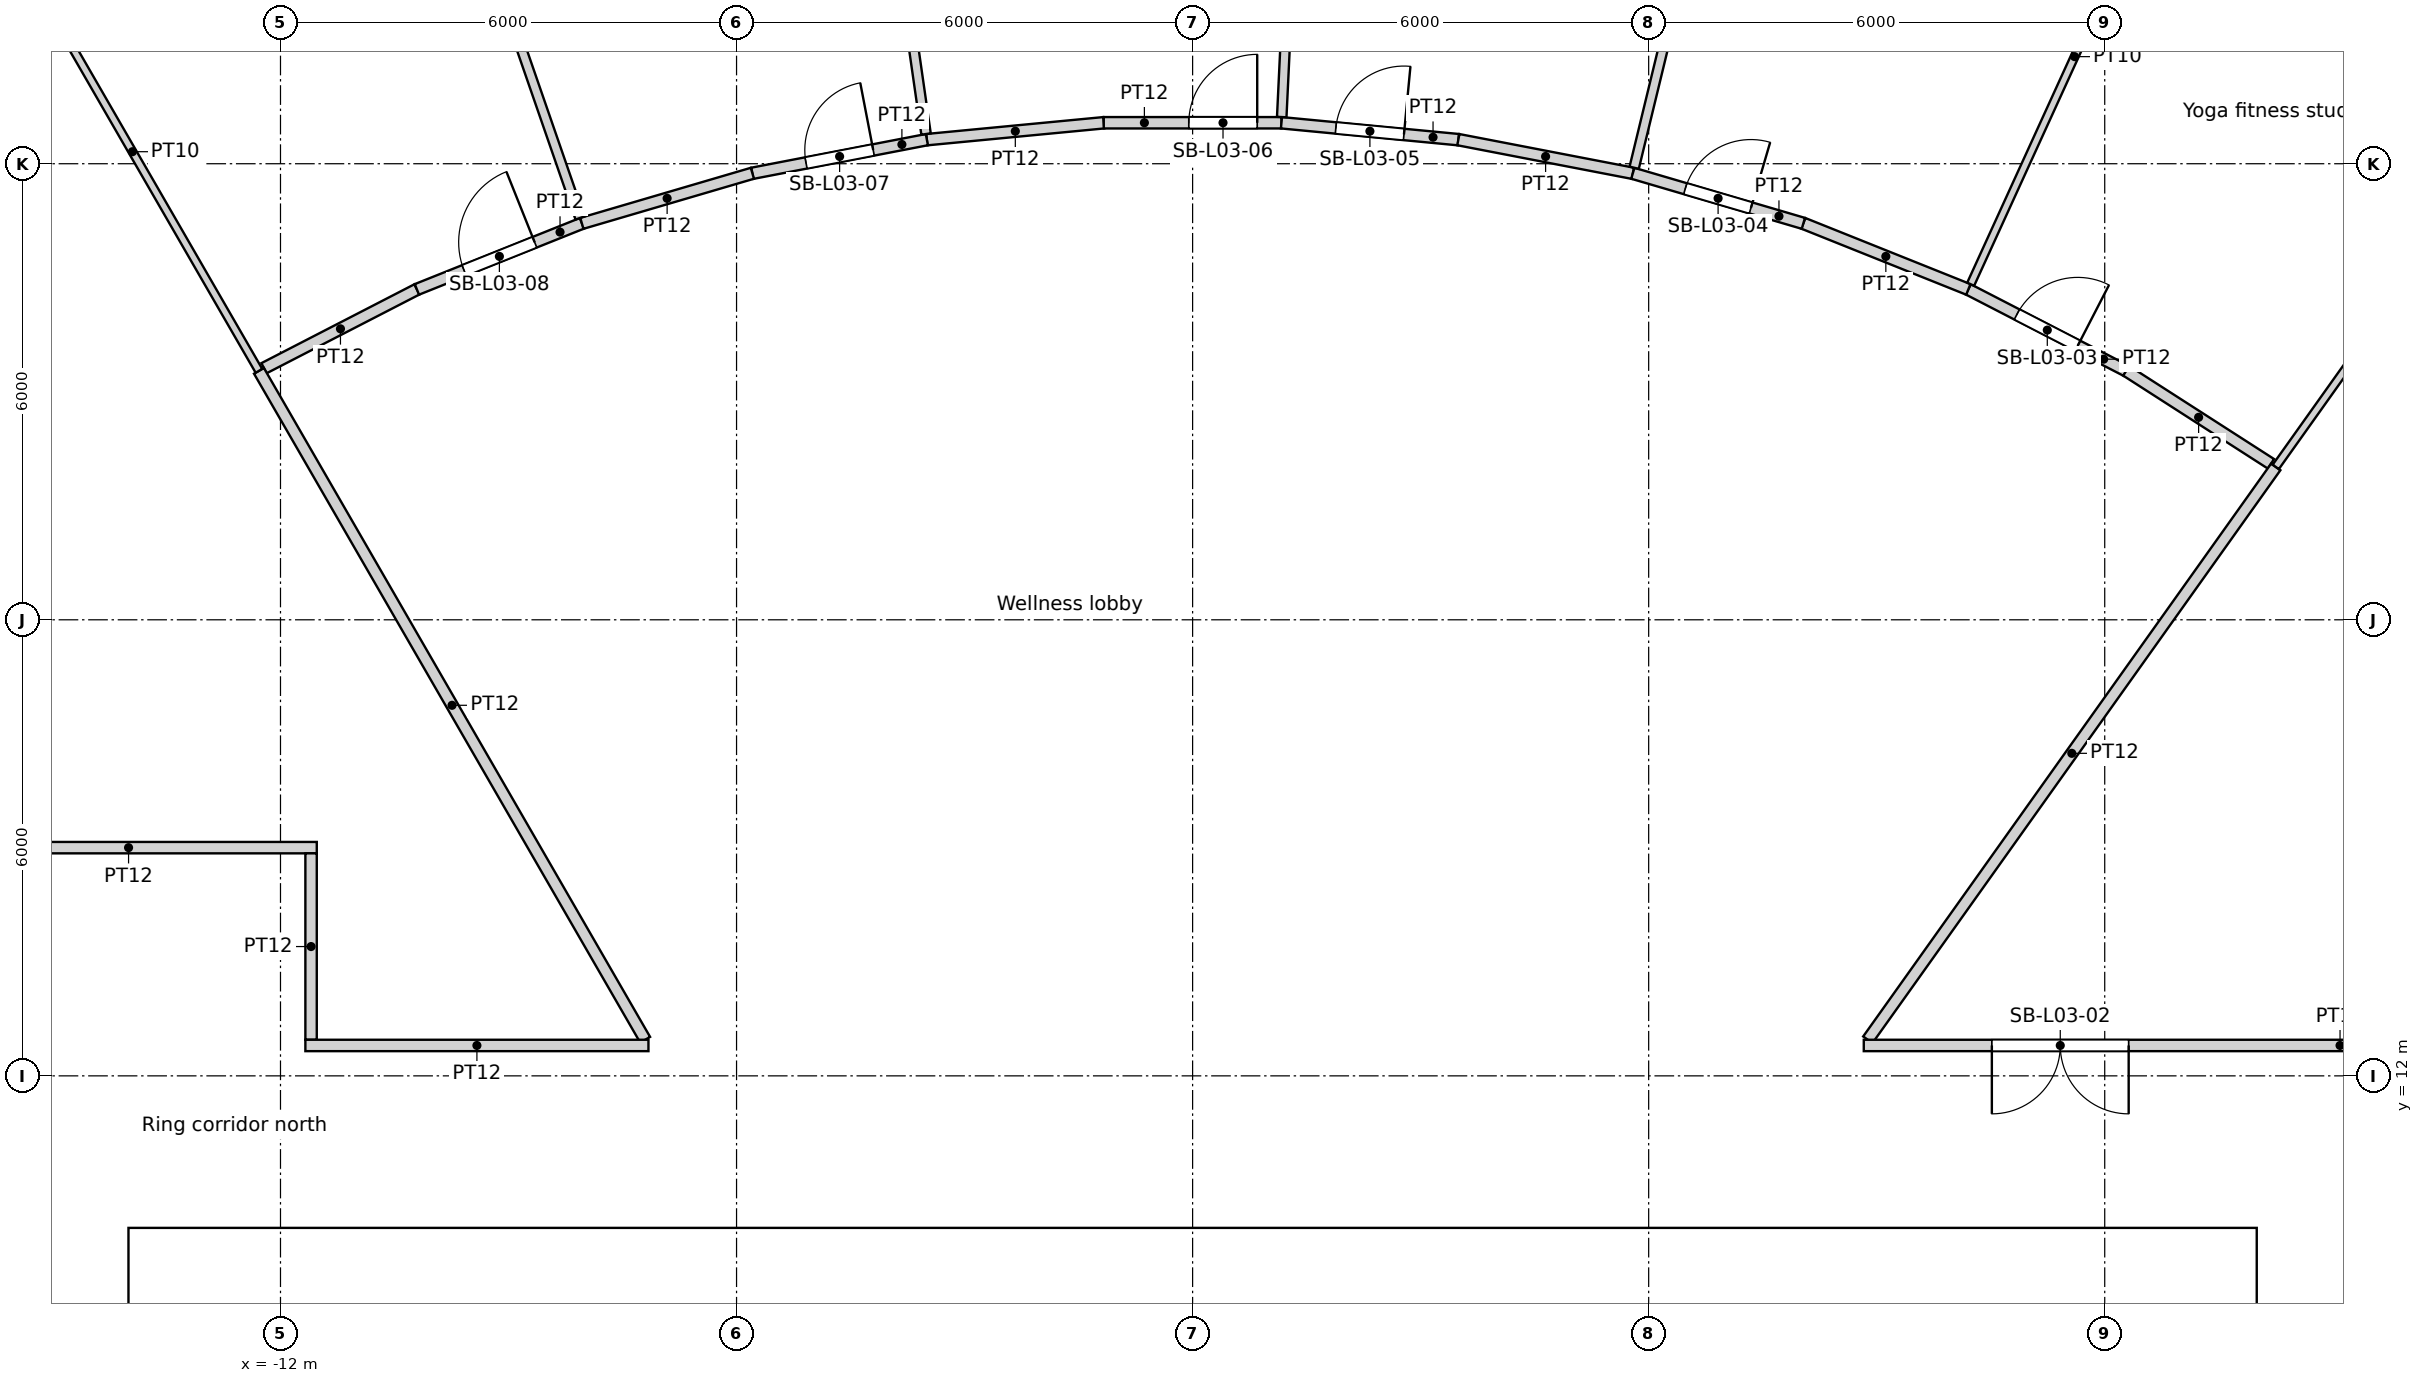
"""IFC4 building model, lengths in metres.
Left out: names, types, materials, properties, quantities, classifications, styles, units other than length and angle.
Written with IfcOpenShell. Run it as: python <this file> out.ifc"""

import sys

from ifc_helpers import new_model, si_unit, direction, frame, frame_2d, origin, origin_2d, place, context, subcontext, project, spatial, rectangle, circle, extrude, element, fill, save


model = new_model("IFC4")
c1 = context("Model", 3, precision=1e-05, world=origin(), true_north=direction((0.0, 1.0)))
c2 = subcontext(c1, "Body", "Model", "MODEL_VIEW")
j1 = project(units=[si_unit("LENGTHUNIT", "METRE"), si_unit("PLANEANGLEUNIT", "RADIAN")], contexts=[c1])
p1 = place(None, origin())
s1 = spatial("IfcSite", under=j1, at=p1, CompositionType="ELEMENT")
p2 = place(p1, origin())
s2 = spatial("IfcBuilding", under=s1, at=p2, CompositionType="ELEMENT")
p3 = place(p2, frame((0.0, 0.0, 18.6)))
s3 = spatial("IfcBuildingStorey", under=s2, at=p3, CompositionType="ELEMENT", Elevation=18.6)
for number, where, z_axis, x_axis in (
    (1, (14.659, 19.69, 0.0), (0.0, 0.0, 1.0), (1.0, 0.0, 0.0)),
    (2, (9.723, 22.54, 0.0), (0.0, 0.0, 1.0), (1.0, 0.0, 0.0)),
    (3, (4.263, 24.175, 0.0), (0.0, 0.0, 1.0), (1.0, 0.0, 0.0)),
    (4, (-1.427, 24.506, 0.0), (0.0, 0.0, 1.0), (1.0, 0.0, 0.0)),
    (5, (-7.04, 23.516, 0.0), (0.0, 0.0, 1.0), (1.0, 0.0, 0.0)),
    (6, (-12.274, 21.259, 0.0), (0.0, 0.0, 1.0), (1.0, 0.0, 0.0)),
):
    element("IfcColumn", number, at=place(p3, frame(where, z_axis=z_axis, x_axis=x_axis)), inside=s3, PredefinedType="COLUMN", context=c2, shape_type="SweptSolid", body=[
        extrude(circle(Radius=0.75, at=origin_2d()), origin(), (0.0, 0.0, 1.0), 4.8),
    ])
for number, where, z_axis, x_axis in (
    (7, (15.552, 10.603, 0.0), (0.0, 0.0, 1.0), (1.0, 0.0, 0.0)),
    (8, (11.735, 14.716, 0.0), (0.0, 0.0, 1.0), (1.0, 0.0, 0.0)),
    (9, (6.876, 17.521, 0.0), (0.0, 0.0, 1.0), (1.0, 0.0, 0.0)),
    (10, (1.406, 18.77, 0.0), (0.0, 0.0, 1.0), (1.0, 0.0, 0.0)),
    (11, (-4.188, 18.35, 0.0), (0.0, 0.0, 1.0), (1.0, 0.0, 0.0)),
    (12, (-9.411, 16.301, 0.0), (0.0, 0.0, 1.0), (1.0, 0.0, 0.0)),
    (13, (-13.798, 12.802, 0.0), (0.0, 0.0, 1.0), (1.0, 0.0, 0.0)),
):
    element("IfcColumn", number, at=place(p3, frame(where, z_axis=z_axis, x_axis=x_axis)), inside=s3, PredefinedType="COLUMN", context=c2, shape_type="SweptSolid", body=[
        extrude(circle(Radius=0.8, at=origin_2d()), origin(), (0.0, 0.0, 1.0), 4.8),
    ])
p4 = place(p3, frame((-14.0, 9.4, 0.0), z_axis=(0.0, 0.0, 1.0), x_axis=(1.0, 0.0, 0.0)))
e14 = element("IfcWall", 14, at=p4, inside=s3, PredefinedType="SOLIDWALL", context=c2, shape_type="SweptSolid", body=[
    extrude(rectangle(XDim=28.0, YDim=1.2, at=frame_2d((14.0, 0.0))), origin(), (0.0, 0.0, 1.0), 4.8),
])
p5 = place(p4, frame((9.8, 0.0, 0.0)))
e15 = element("IfcOpeningElement", 15, at=p5, cuts=e14, PredefinedType="OPENING", context=c2, shape_type="SweptSolid", body=[
    extrude(rectangle(XDim=1.8, YDim=2.1, at=frame_2d((0.9, 1.05))), frame((0.0, 0.6, 0.0), z_axis=(0.0, -1.0, 0.0), x_axis=(1.0, 0.0, 0.0)), (0.0, 0.0, 1.0), 1.2),
])
p6 = place(p3, frame((-15.612, 27.041, 0.0), z_axis=(0.0, 0.0, 1.0), x_axis=(0.499980638446, -0.866036581894, 0.0)))
e16 = element("IfcWall", 16, at=p6, inside=s3, PredefinedType="PARTITIONING", context=c2, shape_type="SweptSolid", body=[
    extrude(rectangle(XDim=6.657, YDim=0.1, at=frame_2d((3.329, 0.0))), origin(), (0.0, 0.0, 1.0), 3.75),
])
p7 = place(p3, frame((-12.283, 21.275, 0.0), z_axis=(0.0, 0.0, 1.0), x_axis=(0.500014995272, -0.866016746087, 0.0)))
e17 = element("IfcWall", 17, at=p7, inside=s3, PredefinedType="PARTITIONING", context=c2, shape_type="SweptSolid", body=[
    extrude(rectangle(XDim=10.162, YDim=0.15, at=frame_2d((5.081, 0.0))), origin(), (0.0, 0.0, 1.0), 3.75),
])
p8 = place(p3, frame((-11.598, 12.475, 0.0), z_axis=(0.0, 0.0, 1.0), x_axis=(0.0, 1.0, 0.0)))
e18 = element("IfcWall", 18, at=p8, inside=s3, PredefinedType="PARTITIONING", context=c2, shape_type="SweptSolid", body=[
    extrude(rectangle(XDim=2.452, YDim=0.15, at=frame_2d((1.226, 0.0))), origin(), (0.0, 0.0, 1.0), 3.75),
])
p9 = place(p3, frame((-11.523, 15.002, 0.0), z_axis=(0.0, 0.0, 1.0), x_axis=(-1.0, 0.0, 0.0)))
e19 = element("IfcWall", 19, at=p9, inside=s3, PredefinedType="PARTITIONING", context=c2, shape_type="SweptSolid", body=[
    extrude(rectangle(XDim=4.952, YDim=0.15, at=frame_2d((2.476, 0.0))), origin(), (0.0, 0.0, 1.0), 3.75),
])
p10 = place(p3, frame((-10.212, 29.507, 0.0), z_axis=(0.0, 0.0, 1.0), x_axis=(0.327055786406, -0.945005033097, 0.0)))
e20 = element("IfcWall", 20, at=p10, inside=s3, PredefinedType="PARTITIONING", context=c2, shape_type="SweptSolid", body=[
    extrude(rectangle(XDim=6.583, YDim=0.125, at=frame_2d((3.291, 0.0))), origin(), (0.0, 0.0, 1.0), 3.75),
])
p11 = place(p3, frame((-10.205, 22.347, 0.0), z_axis=(0.0, 0.0, 1.0), x_axis=(-0.888857404952, -0.458183929947, 0.0)))
e21 = element("IfcWall", 21, at=p11, inside=s3, PredefinedType="PARTITIONING", context=c2, shape_type="SweptSolid", body=[
    extrude(rectangle(XDim=2.263, YDim=0.15, at=frame_2d((1.131, 0.0))), origin(), (0.0, 0.0, 1.0), 3.75),
])
p12 = place(p3, frame((-10.205, 22.347, 0.0), z_axis=(0.0, 0.0, 1.0), x_axis=(0.92836862221, 0.371660734133, 0.0)))
e22 = element("IfcWall", 22, at=p12, inside=s3, PredefinedType="PARTITIONING", context=c2, shape_type="SweptSolid", body=[
    extrude(rectangle(XDim=2.338, YDim=0.15, at=frame_2d((1.169, 0.0))), origin(), (0.0, 0.0, 1.0), 3.75),
])
p13 = place(p12, frame((0.669, 0.0, 0.0)))
e23 = element("IfcOpeningElement", 23, at=p13, cuts=e22, PredefinedType="OPENING", context=c2, shape_type="SweptSolid", body=[
    extrude(rectangle(XDim=1.0, YDim=2.1, at=frame_2d((0.5, 1.05))), frame((0.0, 0.075, 0.0), z_axis=(0.0, -1.0, 0.0), x_axis=(1.0, 0.0, 0.0)), (0.0, 0.0, 1.0), 0.15),
])
p14 = place(p3, frame((-7.159, 12.4, 0.0), z_axis=(0.0, 0.0, 1.0), x_axis=(-1.0, 0.0, 0.0)))
e24 = element("IfcWall", 24, at=p14, inside=s3, PredefinedType="PARTITIONING", context=c2, shape_type="SweptSolid", body=[
    extrude(rectangle(XDim=4.513, YDim=0.15, at=frame_2d((2.257, 0.0))), origin(), (0.0, 0.0, 1.0), 3.75),
])
p15 = place(p3, frame((-5.792, 23.874, 0.0), z_axis=(0.0, 0.0, 1.0), x_axis=(-0.959488462959, -0.28174791827, 0.0)))
e25 = element("IfcWall", 25, at=p15, inside=s3, PredefinedType="PARTITIONING", context=c2, shape_type="SweptSolid", body=[
    extrude(rectangle(XDim=2.338, YDim=0.15, at=frame_2d((1.169, 0.0))), origin(), (0.0, 0.0, 1.0), 3.75),
])
p16 = place(p3, frame((-4.444, 30.906, 0.0), z_axis=(0.0, 0.0, 1.0), x_axis=(0.142314426487, -0.989821501087, 0.0)))
e26 = element("IfcWall", 26, at=p16, inside=s3, PredefinedType="PARTITIONING", context=c2, shape_type="SweptSolid", body=[
    extrude(rectangle(XDim=6.582, YDim=0.125, at=frame_2d((3.291, 0.0))), origin(), (0.0, 0.0, 1.0), 3.75),
])
p17 = place(p3, frame((-5.792, 23.874, 0.0), z_axis=(0.0, 0.0, 1.0), x_axis=(0.981934124814, 0.189223081374, 0.0)))
e27 = element("IfcWall", 27, at=p17, inside=s3, PredefinedType="PARTITIONING", context=c2, shape_type="SweptSolid", body=[
    extrude(rectangle(XDim=2.338, YDim=0.15, at=frame_2d((1.169, 0.0))), origin(), (0.0, 0.0, 1.0), 3.75),
])
p18 = place(p17, frame((0.719, 0.0, 0.0)))
e28 = element("IfcOpeningElement", 28, at=p18, cuts=e27, PredefinedType="OPENING", context=c2, shape_type="SweptSolid", body=[
    extrude(rectangle(XDim=0.9, YDim=2.1, at=frame_2d((0.45, 1.05))), frame((0.0, 0.075, 0.0), z_axis=(0.0, -1.0, 0.0), x_axis=(1.0, 0.0, 0.0)), (0.0, 0.0, 1.0), 0.15),
])
p19 = place(p3, frame((-1.169, 24.539, 0.0), z_axis=(0.0, 0.0, 1.0), x_axis=(-0.995473855736, -0.095035796131, 0.0)))
e29 = element("IfcWall", 29, at=p19, inside=s3, PredefinedType="PARTITIONING", context=c2, shape_type="SweptSolid", body=[
    extrude(rectangle(XDim=2.338, YDim=0.15, at=frame_2d((1.169, 0.0))), origin(), (0.0, 0.0, 1.0), 3.75),
])
p20 = place(p3, frame((-1.169, 24.539, 0.0), z_axis=(0.0, 0.0, 1.0), x_axis=(1.0, 0.0, 0.0)))
e30 = element("IfcWall", 30, at=p20, inside=s3, PredefinedType="PARTITIONING", context=c2, shape_type="SweptSolid", body=[
    extrude(rectangle(XDim=2.338, YDim=0.15, at=frame_2d((1.169, 0.0))), origin(), (0.0, 0.0, 1.0), 3.75),
])
p21 = place(p20, frame((1.119, 0.0, 0.0)))
e31 = element("IfcOpeningElement", 31, at=p21, cuts=e30, PredefinedType="OPENING", context=c2, shape_type="SweptSolid", body=[
    extrude(rectangle(XDim=0.9, YDim=2.1, at=frame_2d((0.45, 1.05))), frame((0.0, 0.075, 0.0), z_axis=(0.0, -1.0, 0.0), x_axis=(1.0, 0.0, 0.0)), (0.0, 0.0, 1.0), 0.15),
])
p22 = place(p3, frame((1.486, 31.189, 0.0), z_axis=(0.0, 0.0, 1.0), x_axis=(-0.047549289688, -0.998868892823, 0.0)))
e32 = element("IfcWall", 32, at=p22, inside=s3, PredefinedType="PARTITIONING", context=c2, shape_type="SweptSolid", body=[
    extrude(rectangle(XDim=6.582, YDim=0.125, at=frame_2d((3.291, 0.0))), origin(), (0.0, 0.0, 1.0), 3.75),
])
p23 = place(p3, frame((1.169, 24.539, 0.0), z_axis=(0.0, 0.0, 1.0), x_axis=(0.995473855736, -0.095035796131, 0.0)))
e33 = element("IfcWall", 33, at=p23, inside=s3, PredefinedType="PARTITIONING", context=c2, shape_type="SweptSolid", body=[
    extrude(rectangle(XDim=2.338, YDim=0.15, at=frame_2d((1.169, 0.0))), origin(), (0.0, 0.0, 1.0), 3.75),
])
p24 = place(p23, frame((0.719, 0.0, 0.0)))
e34 = element("IfcOpeningElement", 34, at=p24, cuts=e33, PredefinedType="OPENING", context=c2, shape_type="SweptSolid", body=[
    extrude(rectangle(XDim=0.9, YDim=2.1, at=frame_2d((0.45, 1.05))), frame((0.0, 0.075, 0.0), z_axis=(0.0, -1.0, 0.0), x_axis=(1.0, 0.0, 0.0)), (0.0, 0.0, 1.0), 0.15),
])
p25 = place(p3, frame((5.792, 23.874, 0.0), z_axis=(0.0, 0.0, 1.0), x_axis=(-0.981934124814, 0.189223081374, 0.0)))
e35 = element("IfcWall", 35, at=p25, inside=s3, PredefinedType="PARTITIONING", context=c2, shape_type="SweptSolid", body=[
    extrude(rectangle(XDim=2.338, YDim=0.15, at=frame_2d((1.169, 0.0))), origin(), (0.0, 0.0, 1.0), 3.75),
])
p26 = place(p3, frame((7.361, 30.344, 0.0), z_axis=(0.0, 0.0, 1.0), x_axis=(-0.235748643115, -0.971814065174, 0.0)))
e36 = element("IfcWall", 36, at=p26, inside=s3, PredefinedType="PARTITIONING", context=c2, shape_type="SweptSolid", body=[
    extrude(rectangle(XDim=6.582, YDim=0.125, at=frame_2d((3.291, 0.0))), origin(), (0.0, 0.0, 1.0), 3.75),
])
p27 = place(p3, frame((5.792, 23.874, 0.0), z_axis=(0.0, 0.0, 1.0), x_axis=(0.959488462959, -0.28174791827, 0.0)))
e37 = element("IfcWall", 37, at=p27, inside=s3, PredefinedType="PARTITIONING", context=c2, shape_type="SweptSolid", body=[
    extrude(rectangle(XDim=2.338, YDim=0.15, at=frame_2d((1.169, 0.0))), origin(), (0.0, 0.0, 1.0), 3.75),
])
p28 = place(p27, frame((0.719, 0.0, 0.0)))
e38 = element("IfcOpeningElement", 38, at=p28, cuts=e37, PredefinedType="OPENING", context=c2, shape_type="SweptSolid", body=[
    extrude(rectangle(XDim=0.9, YDim=2.1, at=frame_2d((0.45, 1.05))), frame((0.0, 0.075, 0.0), z_axis=(0.0, -1.0, 0.0), x_axis=(1.0, 0.0, 0.0)), (0.0, 0.0, 1.0), 0.15),
])
p29 = place(p3, frame((10.205, 22.347, 0.0), z_axis=(0.0, 0.0, 1.0), x_axis=(-0.92836862221, 0.371660734133, 0.0)))
e39 = element("IfcWall", 39, at=p29, inside=s3, PredefinedType="PARTITIONING", context=c2, shape_type="SweptSolid", body=[
    extrude(rectangle(XDim=2.338, YDim=0.15, at=frame_2d((1.169, 0.0))), origin(), (0.0, 0.0, 1.0), 3.75),
])
p30 = place(p3, frame((10.205, 22.347, 0.0), z_axis=(0.0, 0.0, 1.0), x_axis=(0.888845697941, -0.458206640339, 0.0)))
e40 = element("IfcWall", 40, at=p30, inside=s3, PredefinedType="PARTITIONING", context=c2, shape_type="SweptSolid", body=[
    extrude(rectangle(XDim=2.338, YDim=0.15, at=frame_2d((1.169, 0.0))), origin(), (0.0, 0.0, 1.0), 3.75),
])
p31 = place(p30, frame((0.719, 0.0, 0.0)))
e41 = element("IfcOpeningElement", 41, at=p31, cuts=e40, PredefinedType="OPENING", context=c2, shape_type="SweptSolid", body=[
    extrude(rectangle(XDim=0.9, YDim=2.1, at=frame_2d((0.45, 1.05))), frame((0.0, 0.075, 0.0), z_axis=(0.0, -1.0, 0.0), x_axis=(1.0, 0.0, 0.0)), (0.0, 0.0, 1.0), 0.15),
])
p32 = place(p3, frame((12.971, 28.403, 0.0), z_axis=(0.0, 0.0, 1.0), x_axis=(-0.415409113983, -0.909634689323, 0.0)))
e42 = element("IfcWall", 42, at=p32, inside=s3, PredefinedType="PARTITIONING", context=c2, shape_type="SweptSolid", body=[
    extrude(rectangle(XDim=6.582, YDim=0.1, at=frame_2d((3.291, 0.0))), origin(), (0.0, 0.0, 1.0), 3.75),
])
p33 = place(p3, frame((14.25, 20.011, 0.0), z_axis=(0.0, 0.0, 1.0), x_axis=(-0.580061892899, -0.814572403416, 0.0)))
e43 = element("IfcWall", 43, at=p33, inside=s3, PredefinedType="PARTITIONING", context=c2, shape_type="SweptSolid", body=[
    extrude(rectangle(XDim=9.252, YDim=0.15, at=frame_2d((4.626, 0.0))), origin(), (0.0, 0.0, 1.0), 3.75),
])
p34 = place(p3, frame((14.187, 20.052, 0.0), z_axis=(0.0, 0.0, 1.0), x_axis=(-0.841245074687, 0.540653978358, 0.0)))
e44 = element("IfcWall", 44, at=p34, inside=s3, PredefinedType="PARTITIONING", context=c2, shape_type="SweptSolid", body=[
    extrude(rectangle(XDim=2.263, YDim=0.15, at=frame_2d((1.131, 0.0))), origin(), (0.0, 0.0, 1.0), 3.75),
])
p35 = place(p3, frame((8.83, 12.4, 0.0), z_axis=(0.0, 0.0, 1.0), x_axis=(1.0, 0.0, 0.0)))
e45 = element("IfcWall", 45, at=p35, inside=s3, PredefinedType="PARTITIONING", context=c2, shape_type="SweptSolid", body=[
    extrude(rectangle(XDim=8.997, YDim=0.15, at=frame_2d((4.498, 0.0))), origin(), (0.0, 0.0, 1.0), 3.75),
])
p36 = place(p35, frame((1.685, 0.0, 0.0)))
e46 = element("IfcOpeningElement", 46, at=p36, cuts=e45, PredefinedType="OPENING", context=c2, shape_type="SweptSolid", body=[
    extrude(rectangle(XDim=1.8, YDim=2.4, at=frame_2d((0.9, 1.2))), frame((0.0, 0.075, 0.0), z_axis=(0.0, -1.0, 0.0), x_axis=(1.0, 0.0, 0.0)), (0.0, 0.0, 1.0), 0.15),
])
p37 = place(p3, frame((18.112, 25.435, 0.0), z_axis=(0.0, 0.0, 1.0), x_axis=(-0.580061637508, -0.814572585281, 0.0)))
e47 = element("IfcWall", 47, at=p37, inside=s3, PredefinedType="PARTITIONING", context=c2, shape_type="SweptSolid", body=[
    extrude(rectangle(XDim=6.658, YDim=0.1, at=frame_2d((3.329, 0.0))), origin(), (0.0, 0.0, 1.0), 3.75),
])
p38 = place(p5, origin())
e48 = element("IfcDoor", 48, at=p38, inside=s3, OperationType="DOUBLE_DOOR_SINGLE_SWING", PredefinedType="DOOR", context=c2, shape_type="SweptSolid", body=[
    extrude(rectangle(XDim=1.8, YDim=2.1, at=frame_2d((0.9, 1.05))), frame((0.0, 0.025, 0.0), z_axis=(0.0, -1.0, 0.0), x_axis=(1.0, 0.0, 0.0)), (0.0, 0.0, 1.0), 0.05),
])
fill(e15, e48)
p39 = place(p36, origin())
e49 = element("IfcDoor", 49, at=p39, inside=s3, OperationType="DOUBLE_DOOR_SINGLE_SWING", PredefinedType="DOOR", context=c2, shape_type="SweptSolid", body=[
    extrude(rectangle(XDim=1.8, YDim=2.4, at=frame_2d((0.9, 1.2))), frame((0.0, 0.025, 0.0), z_axis=(0.0, -1.0, 0.0), x_axis=(1.0, 0.0, 0.0)), (0.0, 0.0, 1.0), 0.05),
])
fill(e46, e49)
p40 = place(p31, origin())
e50 = element("IfcDoor", 50, at=p40, inside=s3, OperationType="SINGLE_SWING_RIGHT", PredefinedType="DOOR", context=c2, shape_type="SweptSolid", body=[
    extrude(rectangle(XDim=0.9, YDim=2.1, at=frame_2d((0.45, 1.05))), frame((0.0, 0.025, 0.0), z_axis=(0.0, -1.0, 0.0), x_axis=(1.0, 0.0, 0.0)), (0.0, 0.0, 1.0), 0.05),
])
fill(e41, e50)
p41 = place(p28, origin())
e51 = element("IfcDoor", 51, at=p41, inside=s3, OperationType="SINGLE_SWING_RIGHT", PredefinedType="DOOR", context=c2, shape_type="SweptSolid", body=[
    extrude(rectangle(XDim=0.9, YDim=2.1, at=frame_2d((0.45, 1.05))), frame((0.0, 0.025, 0.0), z_axis=(0.0, -1.0, 0.0), x_axis=(1.0, 0.0, 0.0)), (0.0, 0.0, 1.0), 0.05),
])
fill(e38, e51)
p42 = place(p24, origin())
e52 = element("IfcDoor", 52, at=p42, inside=s3, OperationType="SINGLE_SWING_RIGHT", PredefinedType="DOOR", context=c2, shape_type="SweptSolid", body=[
    extrude(rectangle(XDim=0.9, YDim=2.1, at=frame_2d((0.45, 1.05))), frame((0.0, 0.025, 0.0), z_axis=(0.0, -1.0, 0.0), x_axis=(1.0, 0.0, 0.0)), (0.0, 0.0, 1.0), 0.05),
])
fill(e34, e52)
p43 = place(p21, origin())
e53 = element("IfcDoor", 53, at=p43, inside=s3, OperationType="SINGLE_SWING_RIGHT", PredefinedType="DOOR", context=c2, shape_type="SweptSolid", body=[
    extrude(rectangle(XDim=0.9, YDim=2.1, at=frame_2d((0.45, 1.05))), frame((0.0, 0.025, 0.0), z_axis=(0.0, -1.0, 0.0), x_axis=(1.0, 0.0, 0.0)), (0.0, 0.0, 1.0), 0.05),
])
fill(e31, e53)
p44 = place(p18, origin())
e54 = element("IfcDoor", 54, at=p44, inside=s3, OperationType="SINGLE_SWING_RIGHT", PredefinedType="DOOR", context=c2, shape_type="SweptSolid", body=[
    extrude(rectangle(XDim=0.9, YDim=2.1, at=frame_2d((0.45, 1.05))), frame((0.0, 0.025, 0.0), z_axis=(0.0, -1.0, 0.0), x_axis=(1.0, 0.0, 0.0)), (0.0, 0.0, 1.0), 0.05),
])
fill(e28, e54)
p45 = place(p13, origin())
e55 = element("IfcDoor", 55, at=p45, inside=s3, OperationType="SINGLE_SWING_RIGHT", PredefinedType="DOOR", context=c2, shape_type="SweptSolid", body=[
    extrude(rectangle(XDim=1.0, YDim=2.1, at=frame_2d((0.5, 1.05))), frame((0.0, 0.025, 0.0), z_axis=(0.0, -1.0, 0.0), x_axis=(1.0, 0.0, 0.0)), (0.0, 0.0, 1.0), 0.05),
])
fill(e23, e55)
save(model, sys.argv[1])
